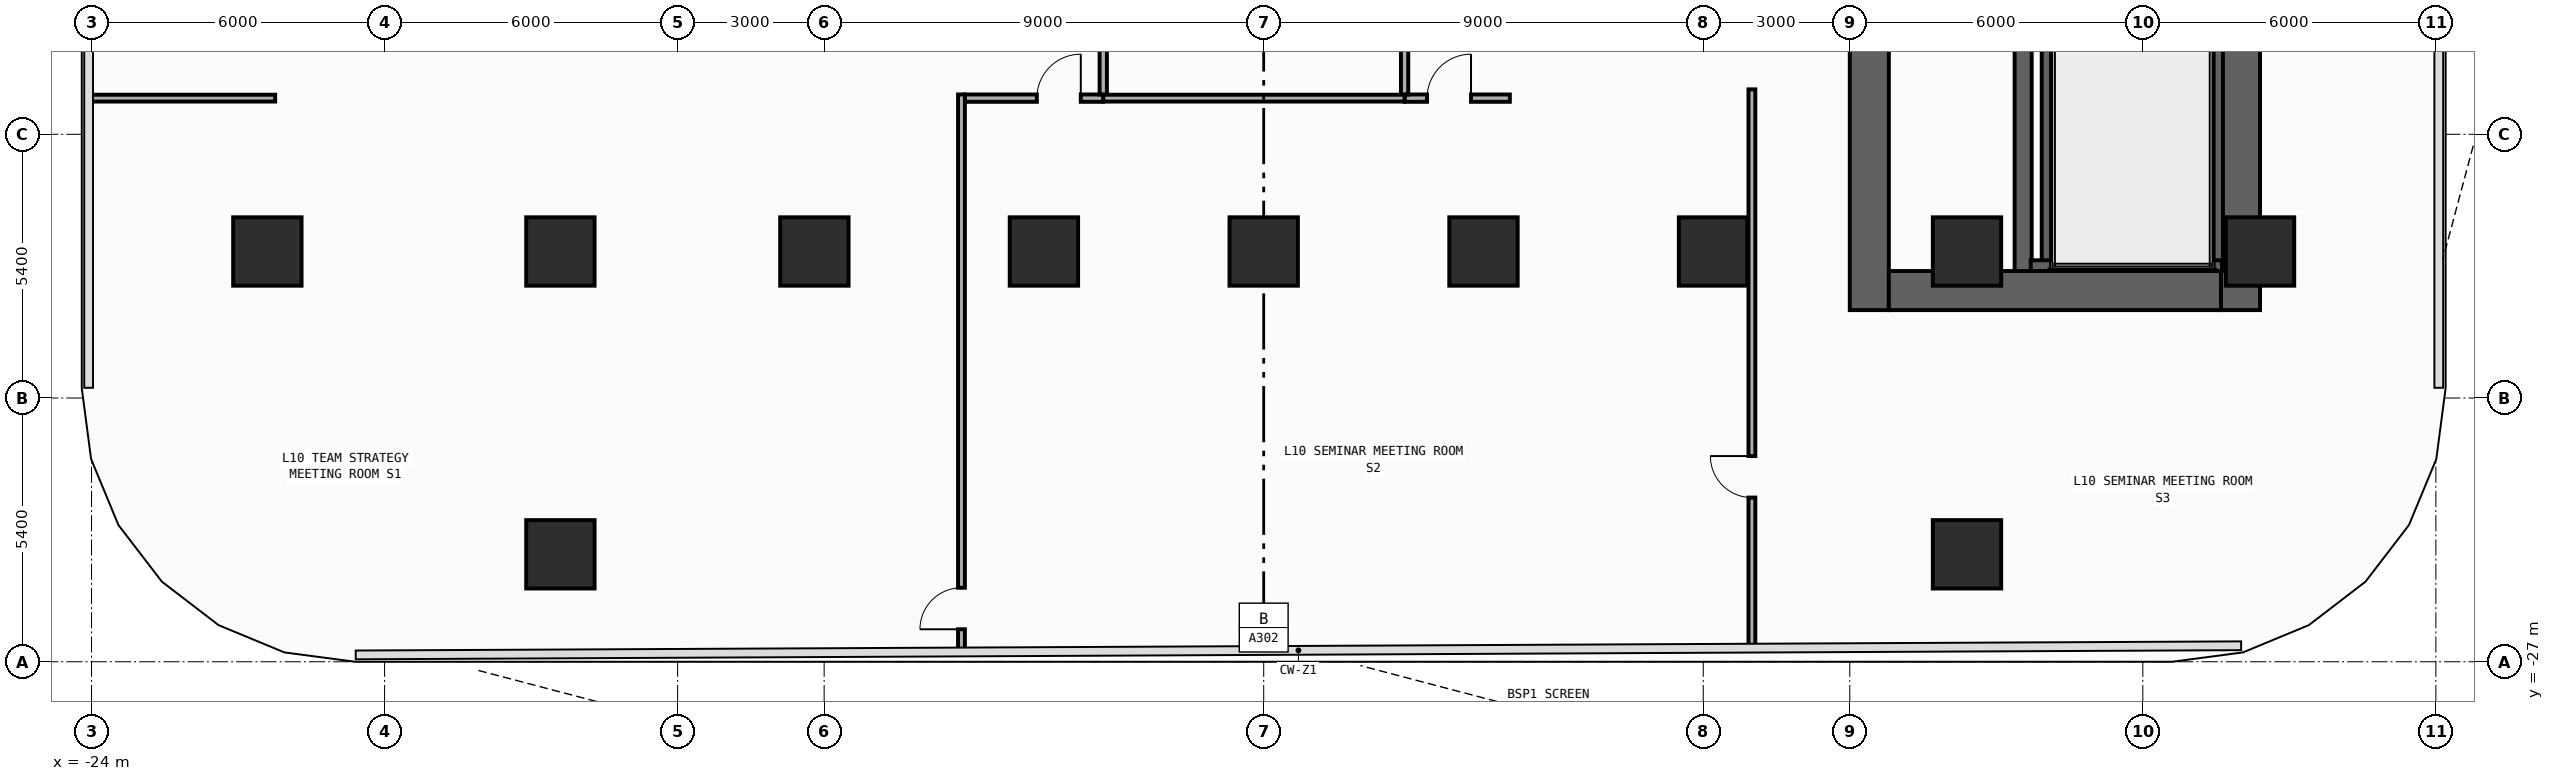
"""IFC4 building model, lengths in metres.
Left out: names, types, materials, properties, quantities, classifications, styles, units other than length and angle.
Written with IfcOpenShell. Run it as: python <this file> out.ifc"""

import sys

from ifc_helpers import new_model, si_unit, direction, frame, frame_2d, origin, origin_2d, place, context, subcontext, project, spatial, rectangle, extrude, element, fill, save


model = new_model("IFC4")
c1 = context("Model", 3, precision=1e-05, world=origin(), true_north=direction((0.0, 1.0)))
c2 = subcontext(c1, "Body", "Model", "MODEL_VIEW")
j1 = project(units=[si_unit("LENGTHUNIT", "METRE"), si_unit("PLANEANGLEUNIT", "RADIAN")], contexts=[c1])
p1 = place(None, origin())
s1 = spatial("IfcSite", under=j1, at=p1, CompositionType="ELEMENT")
p2 = place(p1, origin())
s2 = spatial("IfcBuilding", under=s1, at=p2, CompositionType="ELEMENT")
p3 = place(p2, frame((0.0, 0.0, 42.8)))
s3 = spatial("IfcBuildingStorey", under=s2, at=p3, CompositionType="ELEMENT", Elevation=42.8)
p4 = place(p3, frame((12.4, -19.8, 0.0), z_axis=(0.0, 0.0, 1.0), x_axis=(0.0, 1.0, 0.0)))
e1 = element("IfcWall", 1, at=p4, inside=s3, PredefinedType="SHEAR", context=c2, shape_type="SweptSolid", body=[
    extrude(rectangle(XDim=27.0, YDim=0.8, at=frame_2d((13.5, 0.0))), origin(), (0.0, 0.0, 1.0), 3.94),
])
p5 = place(p4, frame((23.05, 0.0, 0.0)))
e2 = element("IfcOpeningElement", 2, at=p5, cuts=e1, PredefinedType="OPENING", context=c2, shape_type="SweptSolid", body=[
    extrude(rectangle(XDim=1.1, YDim=2.2, at=frame_2d((0.55, 1.1))), frame((0.0, 0.41, 0.0), z_axis=(0.0, -1.0, 0.0), x_axis=(1.0, 0.0, 0.0)), (0.0, 0.0, 1.0), 0.82),
])
p6 = place(p4, frame((19.85, 0.0, 0.0)))
e3 = element("IfcOpeningElement", 3, at=p6, cuts=e1, PredefinedType="OPENING", context=c2, shape_type="SweptSolid", body=[
    extrude(rectangle(XDim=1.1, YDim=2.2, at=frame_2d((0.55, 1.1))), frame((0.0, 0.41, 0.0), z_axis=(0.0, -1.0, 0.0), x_axis=(1.0, 0.0, 0.0)), (0.0, 0.0, 1.0), 0.82),
])
p7 = place(p4, frame((16.65, 0.0, 0.0)))
e4 = element("IfcOpeningElement", 4, at=p7, cuts=e1, PredefinedType="OPENING", context=c2, shape_type="SweptSolid", body=[
    extrude(rectangle(XDim=1.1, YDim=2.2, at=frame_2d((0.55, 1.1))), frame((0.0, 0.41, 0.0), z_axis=(0.0, -1.0, 0.0), x_axis=(1.0, 0.0, 0.0)), (0.0, 0.0, 1.0), 0.82),
])
p8 = place(p4, frame((6.275, 0.0, 0.0)))
e5 = element("IfcOpeningElement", 5, at=p8, cuts=e1, PredefinedType="OPENING", context=c2, shape_type="SweptSolid", body=[
    extrude(rectangle(XDim=0.85, YDim=2.1, at=frame_2d((0.425, 1.05))), frame((0.0, 0.41, 0.0), z_axis=(0.0, -1.0, 0.0), x_axis=(1.0, 0.0, 0.0)), (0.0, 0.0, 1.0), 0.82),
])
p9 = place(p4, frame((8.575, 0.0, 0.0)))
e6 = element("IfcOpeningElement", 6, at=p9, cuts=e1, PredefinedType="OPENING", context=c2, shape_type="SweptSolid", body=[
    extrude(rectangle(XDim=0.85, YDim=2.1, at=frame_2d((0.425, 1.05))), frame((0.0, 0.41, 0.0), z_axis=(0.0, -1.0, 0.0), x_axis=(1.0, 0.0, 0.0)), (0.0, 0.0, 1.0), 0.82),
])
p10 = place(p4, frame((10.675, 0.0, 0.0)))
e7 = element("IfcOpeningElement", 7, at=p10, cuts=e1, PredefinedType="OPENING", context=c2, shape_type="SweptSolid", body=[
    extrude(rectangle(XDim=0.85, YDim=2.1, at=frame_2d((0.425, 1.05))), frame((0.0, 0.41, 0.0), z_axis=(0.0, -1.0, 0.0), x_axis=(1.0, 0.0, 0.0)), (0.0, 0.0, 1.0), 0.82),
])
p11 = place(p4, frame((12.725, 0.0, 0.0)))
e8 = element("IfcOpeningElement", 8, at=p11, cuts=e1, PredefinedType="OPENING", context=c2, shape_type="SweptSolid", body=[
    extrude(rectangle(XDim=1.15, YDim=2.2, at=frame_2d((0.575, 1.1))), frame((0.0, 0.41, 0.0), z_axis=(0.0, -1.0, 0.0), x_axis=(1.0, 0.0, 0.0)), (0.0, 0.0, 1.0), 0.82),
])
p12 = place(p4, frame((25.125, 0.0, 0.0)))
e9 = element("IfcOpeningElement", 9, at=p12, cuts=e1, PredefinedType="OPENING", context=c2, shape_type="SweptSolid", body=[
    extrude(rectangle(XDim=0.85, YDim=2.1, at=frame_2d((0.425, 1.05))), frame((0.0, 0.41, 0.0), z_axis=(0.0, -1.0, 0.0), x_axis=(1.0, 0.0, 0.0)), (0.0, 0.0, 1.0), 0.82),
])
p13 = place(p3, frame((20.0, -19.8, 0.0), z_axis=(0.0, 0.0, 1.0), x_axis=(0.0, 1.0, 0.0)))
e10 = element("IfcWall", 10, at=p13, inside=s3, PredefinedType="SHEAR", context=c2, shape_type="SweptSolid", body=[
    extrude(rectangle(XDim=27.0, YDim=0.8, at=frame_2d((13.5, 0.0))), origin(), (0.0, 0.0, 1.0), 3.94),
])
p14 = place(p3, frame((12.8, -19.4, 0.0), z_axis=(0.0, 0.0, 1.0), x_axis=(1.0, 0.0, 0.0)))
e11 = element("IfcWall", 11, at=p14, inside=s3, PredefinedType="SHEAR", context=c2, shape_type="SweptSolid", body=[
    extrude(rectangle(XDim=6.8, YDim=0.8, at=frame_2d((3.4, 0.0))), origin(), (0.0, 0.0, 1.0), 3.94),
])
p15 = place(p3, frame((15.55, -19.0, 0.0), z_axis=(0.0, 0.0, 1.0), x_axis=(0.0, 1.0, 0.0)))
e12 = element("IfcWall", 12, at=p15, inside=s3, PredefinedType="SHEAR", context=c2, shape_type="SweptSolid", body=[
    extrude(rectangle(XDim=25.4, YDim=0.35, at=frame_2d((12.7, 0.0))), origin(), (0.0, 0.0, 1.0), 3.94),
])
p16 = place(p15, frame((11.925, 0.0, 0.0)))
e13 = element("IfcOpeningElement", 13, at=p16, cuts=e12, PredefinedType="OPENING", context=c2, shape_type="SweptSolid", body=[
    extrude(rectangle(XDim=1.15, YDim=2.2, at=frame_2d((0.575, 1.1))), frame((0.0, 0.185, 0.0), z_axis=(0.0, -1.0, 0.0), x_axis=(1.0, 0.0, 0.0)), (0.0, 0.0, 1.0), 0.37),
])
p17 = place(p15, frame((24.325, 0.0, 0.0)))
e14 = element("IfcOpeningElement", 14, at=p17, cuts=e12, PredefinedType="OPENING", context=c2, shape_type="SweptSolid", body=[
    extrude(rectangle(XDim=0.85, YDim=2.1, at=frame_2d((0.425, 1.05))), frame((0.0, 0.185, 0.0), z_axis=(0.0, -1.0, 0.0), x_axis=(1.0, 0.0, 0.0)), (0.0, 0.0, 1.0), 0.37),
])
for number, where, z_axis, x_axis in (
    (15, (16.04, -18.89, 0.0), (0.0, 0.0, 1.0), (0.0, 1.0, 0.0)),
    (16, (19.53, -18.89, 0.0), (0.0, 0.0, 1.0), (0.0, 1.0, 0.0)),
):
    element("IfcWall", number, at=place(p3, frame(where, z_axis=z_axis, x_axis=x_axis)), inside=s3, PredefinedType="SHEAR", context=c2, shape_type="SweptSolid", body=[
        extrude(rectangle(XDim=11.3, YDim=0.22, at=frame_2d((5.65, 0.0))), origin(), (0.0, 0.0, 1.0), 3.94),
    ])
p18 = place(p3, frame((15.705, -18.89, 0.0), z_axis=(0.0, 0.0, 1.0), x_axis=(1.0, 0.0, 0.0)))
e17 = element("IfcWall", 17, at=p18, inside=s3, PredefinedType="SHEAR", context=c2, shape_type="SweptSolid", body=[
    extrude(rectangle(XDim=3.915, YDim=0.22, at=frame_2d((1.958, 0.0))), origin(), (0.0, 0.0, 1.0), 3.94),
])
for number, where, z_axis, x_axis in (
    (18, (-9.2, -18.6, 0.0), (0.0, 0.0, 1.0), (1.0, 0.0, 0.0)),
    (19, (9.2, -18.6, 0.0), (0.0, 0.0, 1.0), (1.0, 0.0, 0.0)),
    (20, (-20.4, -18.6, 0.0), (0.0, 0.0, 1.0), (1.0, 0.0, 0.0)),
    (21, (20.4, -18.6, 0.0), (0.0, 0.0, 1.0), (1.0, 0.0, 0.0)),
    (22, (-14.4, -18.6, 0.0), (0.0, 0.0, 1.0), (1.0, 0.0, 0.0)),
    (23, (14.4, -18.6, 0.0), (0.0, 0.0, 1.0), (1.0, 0.0, 0.0)),
    (24, (-4.5, -18.6, 0.0), (0.0, 0.0, 1.0), (1.0, 0.0, 0.0)),
    (25, (0.0, -18.6, 0.0), (0.0, 0.0, 1.0), (1.0, 0.0, 0.0)),
    (26, (4.5, -18.6, 0.0), (0.0, 0.0, 1.0), (1.0, 0.0, 0.0)),
    (27, (-14.4, -24.8, 0.0), (0.0, 0.0, 1.0), (1.0, 0.0, 0.0)),
    (28, (14.4, -24.8, 0.0), (0.0, 0.0, 1.0), (1.0, 0.0, 0.0)),
):
    element("IfcColumn", number, at=place(p3, frame(where, z_axis=z_axis, x_axis=x_axis)), inside=s3, PredefinedType="COLUMN", context=c2, shape_type="SweptSolid", body=[
        extrude(rectangle(XDim=1.4, YDim=1.4, at=origin_2d()), origin(), (0.0, 0.0, 1.0), 4.2),
    ])
p19 = place(p3, frame((-6.118, -15.46, 0.0), z_axis=(0.0, 0.0, 1.0), x_axis=(1.0, 0.0, 0.0)))
e29 = element("IfcWall", 29, at=p19, inside=s3, PredefinedType="PARTITIONING", context=c2, shape_type="SweptSolid", body=[
    extrude(rectangle(XDim=2.833, YDim=0.15, at=frame_2d((1.417, 0.0))), origin(), (0.0, 0.0, 1.0), 3.94),
])
p20 = place(p19, frame((1.473, 0.0, 0.0)))
e30 = element("IfcOpeningElement", 30, at=p20, cuts=e29, PredefinedType="OPENING", context=c2, shape_type="SweptSolid", body=[
    extrude(rectangle(XDim=0.9, YDim=2.15, at=frame_2d((0.45, 1.075))), frame((0.0, 0.085, 0.0), z_axis=(0.0, -1.0, 0.0), x_axis=(1.0, 0.0, 0.0)), (0.0, 0.0, 1.0), 0.17),
])
p21 = place(p3, frame((-3.285, -15.385, 0.0), z_axis=(0.0, 0.0, 1.0), x_axis=(0.0, 1.0, 0.0)))
e31 = element("IfcWall", 31, at=p21, inside=s3, PredefinedType="PARTITIONING", context=c2, shape_type="SweptSolid", body=[
    extrude(rectangle(XDim=17.005, YDim=0.15, at=frame_2d((8.502, 0.0))), origin(), (0.0, 0.0, 1.0), 3.94),
])
p22 = place(p21, frame((9.571, 0.0, 0.0)))
e32 = element("IfcOpeningElement", 32, at=p22, cuts=e31, PredefinedType="OPENING", context=c2, shape_type="SweptSolid", body=[
    extrude(rectangle(XDim=0.9, YDim=2.15, at=frame_2d((0.45, 1.075))), frame((0.0, 0.085, 0.0), z_axis=(0.0, -1.0, 0.0), x_axis=(1.0, 0.0, 0.0)), (0.0, 0.0, 1.0), 0.17),
])
p23 = place(p3, frame((2.885, -15.46, 0.0), z_axis=(0.0, 0.0, 1.0), x_axis=(1.0, 0.0, 0.0)))
e33 = element("IfcWall", 33, at=p23, inside=s3, PredefinedType="PARTITIONING", context=c2, shape_type="SweptSolid", body=[
    extrude(rectangle(XDim=2.155, YDim=0.15, at=frame_2d((1.078, 0.0))), origin(), (0.0, 0.0, 1.0), 3.94),
])
p24 = place(p23, frame((0.46, 0.0, 0.0)))
e34 = element("IfcOpeningElement", 34, at=p24, cuts=e33, PredefinedType="OPENING", context=c2, shape_type="SweptSolid", body=[
    extrude(rectangle(XDim=0.9, YDim=2.15, at=frame_2d((0.45, 1.075))), frame((0.0, 0.085, 0.0), z_axis=(0.0, -1.0, 0.0), x_axis=(1.0, 0.0, 0.0)), (0.0, 0.0, 1.0), 0.17),
])
p25 = place(p3, frame((2.885, -15.385, 0.0), z_axis=(0.0, 0.0, 1.0), x_axis=(0.0, 1.0, 0.0)))
e35 = element("IfcWall", 35, at=p25, inside=s3, PredefinedType="PARTITIONING", context=c2, shape_type="SweptSolid", body=[
    extrude(rectangle(XDim=17.005, YDim=0.15, at=frame_2d((8.502, 0.0))), origin(), (0.0, 0.0, 1.0), 3.94),
])
p26 = place(p25, frame((9.571, 0.0, 0.0)))
e36 = element("IfcOpeningElement", 36, at=p26, cuts=e35, PredefinedType="OPENING", context=c2, shape_type="SweptSolid", body=[
    extrude(rectangle(XDim=0.9, YDim=2.15, at=frame_2d((0.45, 1.075))), frame((0.0, 0.085, 0.0), z_axis=(0.0, -1.0, 0.0), x_axis=(1.0, 0.0, 0.0)), (0.0, 0.0, 1.0), 0.17),
])
p27 = place(p3, frame((-24.055, -15.46, 0.0), z_axis=(0.0, 0.0, 1.0), x_axis=(1.0, 0.0, 0.0)))
e37 = element("IfcWall", 37, at=p27, inside=s3, PredefinedType="PARTITIONING", context=c2, shape_type="SweptSolid", body=[
    extrude(rectangle(XDim=3.815, YDim=0.14, at=frame_2d((1.907, 0.0))), origin(), (0.0, 0.0, 1.0), 3.94),
])
p28 = place(p3, frame((-6.188, -26.795, 0.0), z_axis=(0.0, 0.0, 1.0), x_axis=(0.0, 1.0, 0.0)))
e38 = element("IfcWall", 38, at=p28, inside=s3, PredefinedType="PARTITIONING", context=c2, shape_type="SweptSolid", body=[
    extrude(rectangle(XDim=11.41, YDim=0.14, at=frame_2d((5.705, 0.0))), origin(), (0.0, 0.0, 1.0), 3.94),
])
p29 = place(p28, frame((0.46, 0.0, 0.0)))
e39 = element("IfcOpeningElement", 39, at=p29, cuts=e38, PredefinedType="OPENING", context=c2, shape_type="SweptSolid", body=[
    extrude(rectangle(XDim=0.85, YDim=2.1, at=frame_2d((0.425, 1.05))), frame((0.0, 0.08, 0.0), z_axis=(0.0, -1.0, 0.0), x_axis=(1.0, 0.0, 0.0)), (0.0, 0.0, 1.0), 0.16),
])
p30 = place(p3, frame((9.996, -26.716, 0.0), z_axis=(0.0, 0.0, 1.0), x_axis=(0.0, 1.0, 0.0)))
e40 = element("IfcWall", 40, at=p30, inside=s3, PredefinedType="PARTITIONING", context=c2, shape_type="SweptSolid", body=[
    extrude(rectangle(XDim=11.436, YDim=0.14, at=frame_2d((5.718, 0.0))), origin(), (0.0, 0.0, 1.0), 3.94),
])
p31 = place(p30, frame((3.078, 0.0, 0.0)))
e41 = element("IfcOpeningElement", 41, at=p31, cuts=e40, PredefinedType="OPENING", context=c2, shape_type="SweptSolid", body=[
    extrude(rectangle(XDim=0.85, YDim=2.1, at=frame_2d((0.425, 1.05))), frame((0.0, 0.08, 0.0), z_axis=(0.0, -1.0, 0.0), x_axis=(1.0, 0.0, 0.0)), (0.0, 0.0, 1.0), 0.16),
])
p32 = place(p3, frame((-3.285, -15.46, 0.0), z_axis=(0.0, 0.0, 1.0), x_axis=(1.0, 0.0, 0.0)))
e42 = element("IfcWall", 42, at=p32, inside=s3, PredefinedType="PARTITIONING", context=c2, shape_type="SweptSolid", body=[
    extrude(rectangle(XDim=6.17, YDim=0.14, at=frame_2d((3.085, 0.0))), origin(), (0.0, 0.0, 1.0), 3.94),
])
p33 = place(p20, origin())
e43 = element("IfcDoor", 43, at=p33, inside=s3, OperationType="SINGLE_SWING_RIGHT", PredefinedType="DOOR", context=c2, shape_type="SweptSolid", body=[
    extrude(rectangle(XDim=0.9, YDim=2.15, at=frame_2d((0.45, 1.075))), frame((0.0, 0.025, 0.0), z_axis=(0.0, -1.0, 0.0), x_axis=(1.0, 0.0, 0.0)), (0.0, 0.0, 1.0), 0.05),
])
fill(e30, e43)
p34 = place(p24, origin())
e44 = element("IfcDoor", 44, at=p34, inside=s3, OperationType="SINGLE_SWING_RIGHT", PredefinedType="DOOR", context=c2, shape_type="SweptSolid", body=[
    extrude(rectangle(XDim=0.9, YDim=2.15, at=frame_2d((0.45, 1.075))), frame((0.0, 0.025, 0.0), z_axis=(0.0, -1.0, 0.0), x_axis=(1.0, 0.0, 0.0)), (0.0, 0.0, 1.0), 0.05),
])
fill(e34, e44)
p35 = place(p31, origin())
e45 = element("IfcDoor", 45, at=p35, inside=s3, OperationType="SINGLE_SWING_RIGHT", PredefinedType="DOOR", context=c2, shape_type="SweptSolid", body=[
    extrude(rectangle(XDim=0.85, YDim=2.1, at=frame_2d((0.425, 1.05))), frame((0.0, 0.025, 0.0), z_axis=(0.0, -1.0, 0.0), x_axis=(1.0, 0.0, 0.0)), (0.0, 0.0, 1.0), 0.05),
])
fill(e41, e45)
p36 = place(p29, origin())
e46 = element("IfcDoor", 46, at=p36, inside=s3, OperationType="SINGLE_SWING_LEFT", PredefinedType="DOOR", context=c2, shape_type="SweptSolid", body=[
    extrude(rectangle(XDim=0.85, YDim=2.1, at=frame_2d((0.425, 1.05))), frame((0.0, 0.025, 0.0), z_axis=(0.0, -1.0, 0.0), x_axis=(1.0, 0.0, 0.0)), (0.0, 0.0, 1.0), 0.05),
])
fill(e39, e46)
save(model, sys.argv[1])
